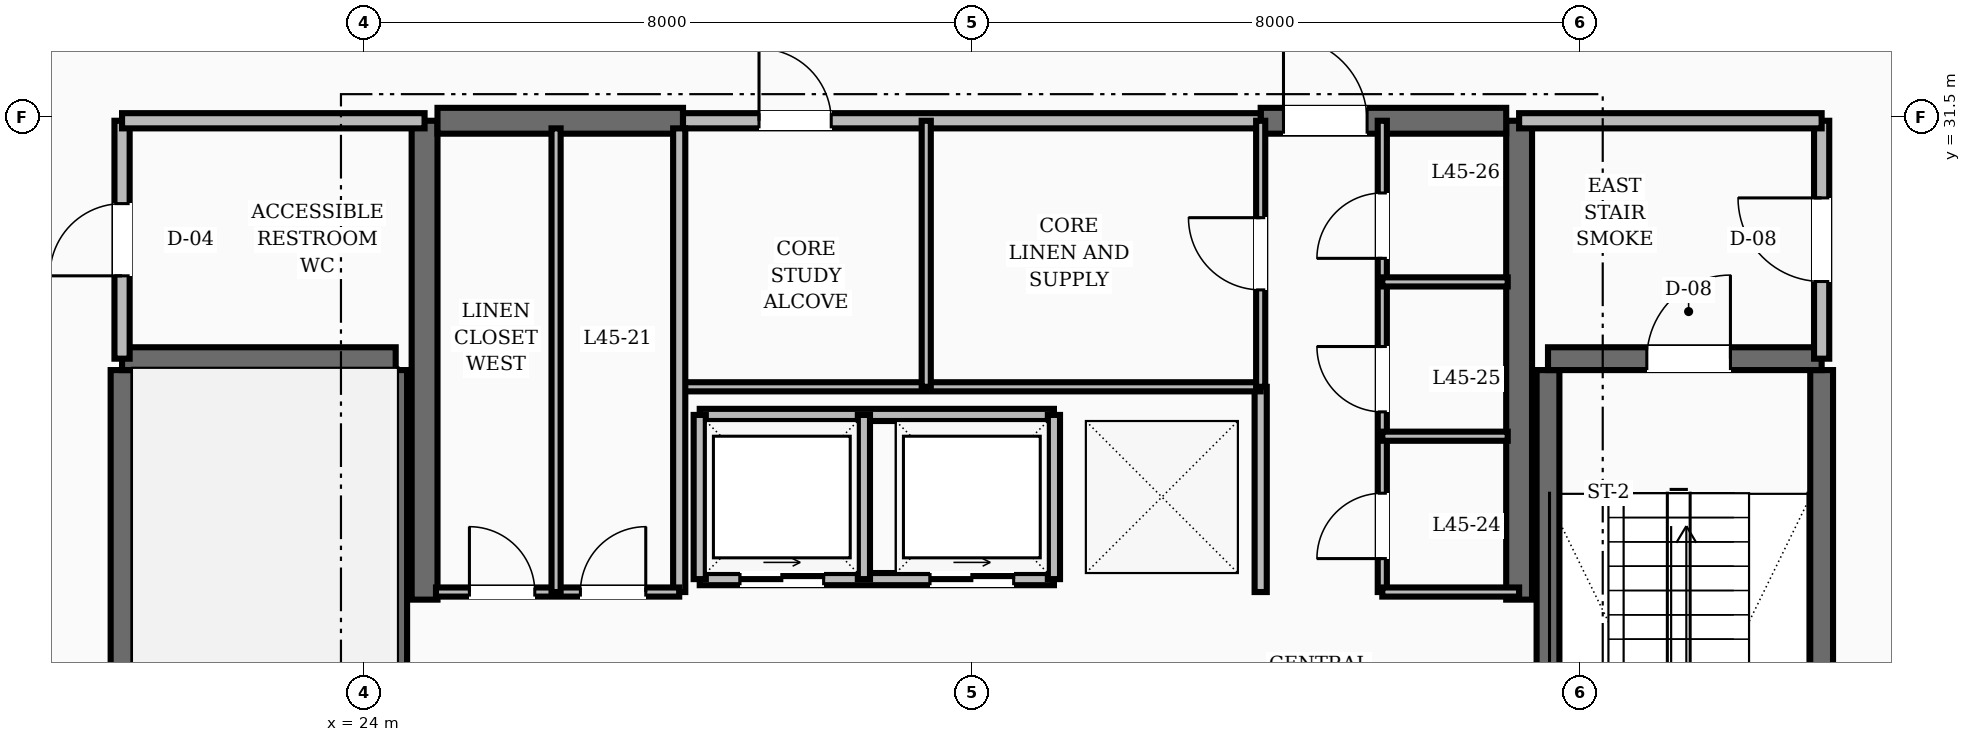
"""IFC4 building model, lengths in metres.
Left out: names, types, materials, properties, quantities, classifications, styles, units other than length and angle.
Written with IfcOpenShell. Run it as: python <this file> out.ifc"""

import sys

from ifc_helpers import new_model, si_unit, direction, frame, frame_2d, origin, place, context, subcontext, project, spatial, rectangle, extrude, element, fill, save


model = new_model("IFC4")
c1 = context("Model", 3, precision=1e-05, world=origin(), true_north=direction((0.0, 1.0)))
c2 = subcontext(c1, "Body", "Model", "MODEL_VIEW")
j1 = project(units=[si_unit("LENGTHUNIT", "METRE"), si_unit("PLANEANGLEUNIT", "RADIAN")], contexts=[c1])
p1 = place(None, origin())
s1 = spatial("IfcSite", under=j1, at=p1, CompositionType="ELEMENT")
p2 = place(p1, origin())
s2 = spatial("IfcBuilding", under=s1, at=p2, CompositionType="ELEMENT")
p3 = place(p2, frame((0.0, 0.0, 174.8)))
s3 = spatial("IfcBuildingStorey", under=s2, at=p3, CompositionType="ELEMENT", Elevation=174.8)
for number, where, z_axis, x_axis in (
    (1, (24.8, 25.15, 0.0), (0.0, 0.0, 1.0), (0.0, 1.0, 0.0)),
    (2, (39.2, 25.15, 0.0), (0.0, 0.0, 1.0), (0.0, 1.0, 0.0)),
):
    element("IfcWall", number, at=place(p3, frame(where, z_axis=z_axis, x_axis=x_axis)), inside=s3, PredefinedType="SHEAR", context=c2, shape_type="SweptSolid", body=[
        extrude(rectangle(XDim=6.3, YDim=0.34, at=frame_2d((3.15, 0.0))), origin(), (0.0, 0.0, 1.0), 3.6),
    ])
p4 = place(p3, frame((24.97, 31.45, 0.0), z_axis=(0.0, 0.0, 1.0), x_axis=(1.0, 0.0, 0.0)))
e3 = element("IfcWall", 3, at=p4, inside=s3, PredefinedType="SHEAR", context=c2, shape_type="SweptSolid", body=[
    extrude(rectangle(XDim=3.23, YDim=0.34, at=frame_2d((1.615, 0.0))), origin(), (0.0, 0.0, 1.0), 3.6),
])
p5 = place(p3, frame((35.8, 31.45, 0.0), z_axis=(0.0, 0.0, 1.0), x_axis=(1.0, 0.0, 0.0)))
e4 = element("IfcWall", 4, at=p5, inside=s3, PredefinedType="SHEAR", context=c2, shape_type="SweptSolid", body=[
    extrude(rectangle(XDim=3.23, YDim=0.34, at=frame_2d((1.615, 0.0))), origin(), (0.0, 0.0, 1.0), 3.6),
])
p6 = place(p5, frame((0.3, 0.0, 0.0)))
e5 = element("IfcOpeningElement", 5, at=p6, cuts=e4, PredefinedType="OPENING", context=c2, shape_type="SweptSolid", body=[
    extrude(rectangle(XDim=1.1, YDim=2.1, at=frame_2d((0.55, 1.05))), frame((0.0, 0.18, 0.0), z_axis=(0.0, -1.0, 0.0), x_axis=(1.0, 0.0, 0.0)), (0.0, 0.0, 1.0), 0.36),
])
for number, where, z_axis, x_axis in (
    (6, (20.82, 19.43, 0.0), (0.0, 0.0, 1.0), (0.0, 1.0, 0.0)),
    (7, (24.42, 19.43, 0.0), (0.0, 0.0, 1.0), (0.0, 1.0, 0.0)),
):
    element("IfcWall", number, at=place(p3, frame(where, z_axis=z_axis, x_axis=x_axis)), inside=s3, PredefinedType="SHEAR", context=c2, shape_type="SweptSolid", body=[
        extrude(rectangle(XDim=8.74, YDim=0.3, at=frame_2d((4.37, 0.0))), origin(), (0.0, 0.0, 1.0), 3.6),
    ])
p7 = place(p3, frame((20.82, 28.32, 0.0), z_axis=(0.0, 0.0, 1.0), x_axis=(1.0, 0.0, 0.0)))
e8 = element("IfcWall", 8, at=p7, inside=s3, PredefinedType="SHEAR", context=c2, shape_type="SweptSolid", body=[
    extrude(rectangle(XDim=3.6, YDim=0.3, at=frame_2d((1.8, 0.0))), origin(), (0.0, 0.0, 1.0), 3.6),
])
for number, where, z_axis, x_axis in (
    (9, (43.18, 19.43, 0.0), (0.0, 0.0, 1.0), (0.0, 1.0, 0.0)),
    (10, (39.58, 19.43, 0.0), (0.0, 0.0, 1.0), (0.0, 1.0, 0.0)),
):
    element("IfcWall", number, at=place(p3, frame(where, z_axis=z_axis, x_axis=x_axis)), inside=s3, PredefinedType="SHEAR", context=c2, shape_type="SweptSolid", body=[
        extrude(rectangle(XDim=8.74, YDim=0.3, at=frame_2d((4.37, 0.0))), origin(), (0.0, 0.0, 1.0), 3.6),
    ])
p8 = place(p3, frame((39.58, 28.32, 0.0), z_axis=(0.0, 0.0, 1.0), x_axis=(1.0, 0.0, 0.0)))
e11 = element("IfcWall", 11, at=p8, inside=s3, PredefinedType="SHEAR", context=c2, shape_type="SweptSolid", body=[
    extrude(rectangle(XDim=3.6, YDim=0.3, at=frame_2d((1.8, 0.0))), origin(), (0.0, 0.0, 1.0), 3.6),
])
p9 = place(p8, frame((1.3, 0.0, 0.0)))
e12 = element("IfcOpeningElement", 12, at=p9, cuts=e11, PredefinedType="OPENING", context=c2, shape_type="SweptSolid", body=[
    extrude(rectangle(XDim=1.1, YDim=2.1, at=frame_2d((0.55, 1.05))), frame((0.0, 0.16, 0.0), z_axis=(0.0, -1.0, 0.0), x_axis=(1.0, 0.0, 0.0)), (0.0, 0.0, 1.0), 0.32),
])
p10 = place(p3, frame((43.18, 28.32, 0.0), z_axis=(0.0, 0.0, 1.0), x_axis=(0.0, 1.0, 0.0)))
e13 = element("IfcWall", 13, at=p10, inside=s3, PredefinedType="SOLIDWALL", context=c2, shape_type="SweptSolid", body=[
    extrude(rectangle(XDim=3.13, YDim=0.2, at=frame_2d((1.565, 0.0))), origin(), (0.0, 0.0, 1.0), 2.8),
])
p11 = place(p10, frame((1.015, 0.0, 0.0)))
e14 = element("IfcOpeningElement", 14, at=p11, cuts=e13, PredefinedType="OPENING", context=c2, shape_type="SweptSolid", body=[
    extrude(rectangle(XDim=1.1, YDim=2.1, at=frame_2d((0.55, 1.05))), frame((0.0, 0.11, 0.0), z_axis=(0.0, -1.0, 0.0), x_axis=(1.0, 0.0, 0.0)), (0.0, 0.0, 1.0), 0.22),
])
p12 = place(p3, frame((39.2, 31.45, 0.0), z_axis=(0.0, 0.0, 1.0), x_axis=(1.0, 0.0, 0.0)))
e15 = element("IfcWall", 15, at=p12, inside=s3, PredefinedType="SOLIDWALL", context=c2, shape_type="SweptSolid", body=[
    extrude(rectangle(XDim=3.98, YDim=0.2, at=frame_2d((1.99, 0.0))), origin(), (0.0, 0.0, 1.0), 2.8),
])
p13 = place(p3, frame((20.82, 28.32, 0.0), z_axis=(0.0, 0.0, 1.0), x_axis=(0.0, 1.0, 0.0)))
e16 = element("IfcWall", 16, at=p13, inside=s3, PredefinedType="SOLIDWALL", context=c2, shape_type="SweptSolid", body=[
    extrude(rectangle(XDim=3.13, YDim=0.2, at=frame_2d((1.565, 0.0))), origin(), (0.0, 0.0, 1.0), 2.8),
])
p14 = place(p13, frame((1.09, 0.0, 0.0)))
e17 = element("IfcOpeningElement", 17, at=p14, cuts=e16, PredefinedType="OPENING", context=c2, shape_type="SweptSolid", body=[
    extrude(rectangle(XDim=0.95, YDim=2.1, at=frame_2d((0.475, 1.05))), frame((0.0, 0.11, 0.0), z_axis=(0.0, -1.0, 0.0), x_axis=(1.0, 0.0, 0.0)), (0.0, 0.0, 1.0), 0.22),
])
p15 = place(p3, frame((20.82, 31.45, 0.0), z_axis=(0.0, 0.0, 1.0), x_axis=(1.0, 0.0, 0.0)))
e18 = element("IfcWall", 18, at=p15, inside=s3, PredefinedType="SOLIDWALL", context=c2, shape_type="SweptSolid", body=[
    extrude(rectangle(XDim=3.98, YDim=0.2, at=frame_2d((1.99, 0.0))), origin(), (0.0, 0.0, 1.0), 2.8),
])
p16 = place(p3, frame((35.8, 25.25, 0.0), z_axis=(0.0, 0.0, 1.0), x_axis=(0.0, 1.0, 0.0)))
e19 = element("IfcWall", 19, at=p16, inside=s3, PredefinedType="SOLIDWALL", context=c2, shape_type="SweptSolid", body=[
    extrude(rectangle(XDim=2.7, YDim=0.16, at=frame_2d((1.35, 0.0))), origin(), (0.0, 0.0, 1.0), 2.8),
])
p17 = place(p3, frame((28.42, 25.42, 0.0), z_axis=(0.0, 0.0, 1.0), x_axis=(1.0, 0.0, 0.0)))
e20 = element("IfcWall", 20, at=p17, inside=s3, PredefinedType="SOLIDWALL", context=c2, shape_type="SweptSolid", body=[
    extrude(rectangle(XDim=4.66, YDim=0.16, at=frame_2d((2.33, 0.0))), origin(), (0.0, 0.0, 1.0), 2.8),
])
p18 = place(p17, frame((0.53, 0.0, 0.0)))
e21 = element("IfcOpeningElement", 21, at=p18, cuts=e20, PredefinedType="OPENING", context=c2, shape_type="SweptSolid", body=[
    extrude(rectangle(XDim=1.1, YDim=2.15, at=frame_2d((0.55, 1.075))), frame((0.0, 0.09, 0.0), z_axis=(0.0, -1.0, 0.0), x_axis=(1.0, 0.0, 0.0)), (0.0, 0.0, 1.0), 0.18),
])
p19 = place(p17, frame((3.03, 0.0, 0.0)))
e22 = element("IfcOpeningElement", 22, at=p19, cuts=e20, PredefinedType="OPENING", context=c2, shape_type="SweptSolid", body=[
    extrude(rectangle(XDim=1.1, YDim=2.15, at=frame_2d((0.55, 1.075))), frame((0.0, 0.09, 0.0), z_axis=(0.0, -1.0, 0.0), x_axis=(1.0, 0.0, 0.0)), (0.0, 0.0, 1.0), 0.18),
])
p20 = place(p3, frame((28.42, 27.58, 0.0), z_axis=(0.0, 0.0, 1.0), x_axis=(1.0, 0.0, 0.0)))
e23 = element("IfcWall", 23, at=p20, inside=s3, PredefinedType="SOLIDWALL", context=c2, shape_type="SweptSolid", body=[
    extrude(rectangle(XDim=4.66, YDim=0.16, at=frame_2d((2.33, 0.0))), origin(), (0.0, 0.0, 1.0), 2.8),
])
for number, where, z_axis, x_axis in (
    (24, (28.42, 25.42, 0.0), (0.0, 0.0, 1.0), (0.0, 1.0, 0.0)),
    (25, (30.58, 25.42, 0.0), (0.0, 0.0, 1.0), (0.0, 1.0, 0.0)),
    (26, (33.08, 25.42, 0.0), (0.0, 0.0, 1.0), (0.0, 1.0, 0.0)),
):
    element("IfcWall", number, at=place(p3, frame(where, z_axis=z_axis, x_axis=x_axis)), inside=s3, PredefinedType="SOLIDWALL", context=c2, shape_type="SweptSolid", body=[
        extrude(rectangle(XDim=2.16, YDim=0.16, at=frame_2d((1.08, 0.0))), origin(), (0.0, 0.0, 1.0), 2.8),
    ])
p21 = place(p3, frame((28.2, 31.45, 0.0), z_axis=(0.0, 0.0, 1.0), x_axis=(1.0, 0.0, 0.0)))
e27 = element("IfcWall", 27, at=p21, inside=s3, PredefinedType="SOLIDWALL", context=c2, shape_type="SweptSolid", body=[
    extrude(rectangle(XDim=7.6, YDim=0.2, at=frame_2d((3.8, 0.0))), origin(), (0.0, 0.0, 1.0), 2.8),
])
p22 = place(p21, frame((1.0, 0.0, 0.0)))
e28 = element("IfcOpeningElement", 28, at=p22, cuts=e27, PredefinedType="OPENING", context=c2, shape_type="SweptSolid", body=[
    extrude(rectangle(XDim=0.95, YDim=2.1, at=frame_2d((0.475, 1.05))), frame((0.0, 0.11, 0.0), z_axis=(0.0, -1.0, 0.0), x_axis=(1.0, 0.0, 0.0)), (0.0, 0.0, 1.0), 0.22),
])
p23 = place(p3, frame((28.2, 27.95, 0.0), z_axis=(0.0, 0.0, 1.0), x_axis=(1.0, 0.0, 0.0)))
e29 = element("IfcWall", 29, at=p23, inside=s3, PredefinedType="PARTITIONING", context=c2, shape_type="SweptSolid", body=[
    extrude(rectangle(XDim=7.6, YDim=0.12, at=frame_2d((3.8, 0.0))), origin(), (0.0, 0.0, 1.0), 2.8),
])
p24 = place(p3, frame((35.8, 27.95, 0.0), z_axis=(0.0, 0.0, 1.0), x_axis=(0.0, 1.0, 0.0)))
e30 = element("IfcWall", 30, at=p24, inside=s3, PredefinedType="PARTITIONING", context=c2, shape_type="SweptSolid", body=[
    extrude(rectangle(XDim=3.5, YDim=0.12, at=frame_2d((1.75, 0.0))), origin(), (0.0, 0.0, 1.0), 2.8),
])
p25 = place(p24, frame((1.275, 0.0, 0.0)))
e31 = element("IfcOpeningElement", 31, at=p25, cuts=e30, PredefinedType="OPENING", context=c2, shape_type="SweptSolid", body=[
    extrude(rectangle(XDim=0.95, YDim=2.1, at=frame_2d((0.475, 1.05))), frame((0.0, 0.07, 0.0), z_axis=(0.0, -1.0, 0.0), x_axis=(1.0, 0.0, 0.0)), (0.0, 0.0, 1.0), 0.14),
])
p26 = place(p3, frame((31.4, 27.95, 0.0), z_axis=(0.0, 0.0, 1.0), x_axis=(0.0, 1.0, 0.0)))
e32 = element("IfcWall", 32, at=p26, inside=s3, PredefinedType="PARTITIONING", context=c2, shape_type="SweptSolid", body=[
    extrude(rectangle(XDim=3.5, YDim=0.12, at=frame_2d((1.75, 0.0))), origin(), (0.0, 0.0, 1.0), 2.8),
])
p27 = place(p3, frame((28.15, 25.25, 0.0), z_axis=(0.0, 0.0, 1.0), x_axis=(0.0, 1.0, 0.0)))
e33 = element("IfcWall", 33, at=p27, inside=s3, PredefinedType="SOLIDWALL", context=c2, shape_type="SweptSolid", body=[
    extrude(rectangle(XDim=6.1, YDim=0.16, at=frame_2d((3.05, 0.0))), origin(), (0.0, 0.0, 1.0), 2.8),
])
p28 = place(p3, frame((24.95, 25.25, 0.0), z_axis=(0.0, 0.0, 1.0), x_axis=(1.0, 0.0, 0.0)))
e34 = element("IfcWall", 34, at=p28, inside=s3, PredefinedType="PARTITIONING", context=c2, shape_type="SweptSolid", body=[
    extrude(rectangle(XDim=3.2, YDim=0.12, at=frame_2d((1.6, 0.0))), origin(), (0.0, 0.0, 1.0), 2.8),
])
p29 = place(p28, frame((0.44, 0.0, 0.0)))
e35 = element("IfcOpeningElement", 35, at=p29, cuts=e34, PredefinedType="OPENING", context=c2, shape_type="SweptSolid", body=[
    extrude(rectangle(XDim=0.86, YDim=2.1, at=frame_2d((0.43, 1.05))), frame((0.0, 0.07, 0.0), z_axis=(0.0, -1.0, 0.0), x_axis=(1.0, 0.0, 0.0)), (0.0, 0.0, 1.0), 0.14),
])
p30 = place(p28, frame((1.9, 0.0, 0.0)))
e36 = element("IfcOpeningElement", 36, at=p30, cuts=e34, PredefinedType="OPENING", context=c2, shape_type="SweptSolid", body=[
    extrude(rectangle(XDim=0.86, YDim=2.1, at=frame_2d((0.43, 1.05))), frame((0.0, 0.07, 0.0), z_axis=(0.0, -1.0, 0.0), x_axis=(1.0, 0.0, 0.0)), (0.0, 0.0, 1.0), 0.14),
])
p31 = place(p3, frame((37.4, 25.25, 0.0), z_axis=(0.0, 0.0, 1.0), x_axis=(0.0, 1.0, 0.0)))
e37 = element("IfcWall", 37, at=p31, inside=s3, PredefinedType="PARTITIONING", context=c2, shape_type="SweptSolid", body=[
    extrude(rectangle(XDim=6.2, YDim=0.12, at=frame_2d((3.1, 0.0))), origin(), (0.0, 0.0, 1.0), 2.8),
])
p32 = place(p31, frame((0.44, 0.0, 0.0)))
e38 = element("IfcOpeningElement", 38, at=p32, cuts=e37, PredefinedType="OPENING", context=c2, shape_type="SweptSolid", body=[
    extrude(rectangle(XDim=0.86, YDim=2.1, at=frame_2d((0.43, 1.05))), frame((0.0, 0.07, 0.0), z_axis=(0.0, -1.0, 0.0), x_axis=(1.0, 0.0, 0.0)), (0.0, 0.0, 1.0), 0.14),
])
p33 = place(p31, frame((2.37, 0.0, 0.0)))
e39 = element("IfcOpeningElement", 39, at=p33, cuts=e37, PredefinedType="OPENING", context=c2, shape_type="SweptSolid", body=[
    extrude(rectangle(XDim=0.86, YDim=2.1, at=frame_2d((0.43, 1.05))), frame((0.0, 0.07, 0.0), z_axis=(0.0, -1.0, 0.0), x_axis=(1.0, 0.0, 0.0)), (0.0, 0.0, 1.0), 0.14),
])
p34 = place(p31, frame((4.39, 0.0, 0.0)))
e40 = element("IfcOpeningElement", 40, at=p34, cuts=e37, PredefinedType="OPENING", context=c2, shape_type="SweptSolid", body=[
    extrude(rectangle(XDim=0.86, YDim=2.1, at=frame_2d((0.43, 1.05))), frame((0.0, 0.07, 0.0), z_axis=(0.0, -1.0, 0.0), x_axis=(1.0, 0.0, 0.0)), (0.0, 0.0, 1.0), 0.14),
])
p35 = place(p3, frame((37.4, 25.25, 0.0), z_axis=(0.0, 0.0, 1.0), x_axis=(1.0, 0.0, 0.0)))
e41 = element("IfcWall", 41, at=p35, inside=s3, PredefinedType="PARTITIONING", context=c2, shape_type="SweptSolid", body=[
    extrude(rectangle(XDim=1.8, YDim=0.12, at=frame_2d((0.9, 0.0))), origin(), (0.0, 0.0, 1.0), 2.8),
])
p36 = place(p3, frame((26.53, 25.25, 0.0), z_axis=(0.0, 0.0, 1.0), x_axis=(0.0, 1.0, 0.0)))
e42 = element("IfcWall", 42, at=p36, inside=s3, PredefinedType="PARTITIONING", context=c2, shape_type="SweptSolid", body=[
    extrude(rectangle(XDim=6.1, YDim=0.12, at=frame_2d((3.05, 0.0))), origin(), (0.0, 0.0, 1.0), 2.8),
])
for number, where, z_axis, x_axis in (
    (43, (37.4, 27.3, 0.0), (0.0, 0.0, 1.0), (1.0, 0.0, 0.0)),
    (44, (37.4, 29.33, 0.0), (0.0, 0.0, 1.0), (1.0, 0.0, 0.0)),
):
    element("IfcWall", number, at=place(p3, frame(where, z_axis=z_axis, x_axis=x_axis)), inside=s3, PredefinedType="PARTITIONING", context=c2, shape_type="SweptSolid", body=[
        extrude(rectangle(XDim=1.65, YDim=0.12, at=frame_2d((0.825, 0.0))), origin(), (0.0, 0.0, 1.0), 2.8),
    ])
p37 = place(p9, origin())
e45 = element("IfcDoor", 45, at=p37, inside=s3, OperationType="SINGLE_SWING_RIGHT", PredefinedType="DOOR", context=c2, shape_type="SweptSolid", body=[
    extrude(rectangle(XDim=1.1, YDim=2.1, at=frame_2d((0.55, 1.05))), frame((0.0, 0.025, 0.0), z_axis=(0.0, -1.0, 0.0), x_axis=(1.0, 0.0, 0.0)), (0.0, 0.0, 1.0), 0.05),
])
fill(e12, e45)
p38 = place(p11, origin())
e46 = element("IfcDoor", 46, at=p38, inside=s3, OperationType="SINGLE_SWING_RIGHT", PredefinedType="DOOR", context=c2, shape_type="SweptSolid", body=[
    extrude(rectangle(XDim=1.1, YDim=2.1, at=frame_2d((0.55, 1.05))), frame((0.0, 0.025, 0.0), z_axis=(0.0, -1.0, 0.0), x_axis=(1.0, 0.0, 0.0)), (0.0, 0.0, 1.0), 0.05),
])
fill(e14, e46)
p39 = place(p14, origin())
e47 = element("IfcDoor", 47, at=p39, inside=s3, OperationType="SINGLE_SWING_LEFT", PredefinedType="DOOR", context=c2, shape_type="SweptSolid", body=[
    extrude(rectangle(XDim=0.95, YDim=2.1, at=frame_2d((0.475, 1.05))), frame((0.0, 0.025, 0.0), z_axis=(0.0, -1.0, 0.0), x_axis=(1.0, 0.0, 0.0)), (0.0, 0.0, 1.0), 0.05),
])
fill(e17, e47)
p40 = place(p6, origin())
e48 = element("IfcDoor", 48, at=p40, inside=s3, OperationType="SINGLE_SWING_LEFT", PredefinedType="DOOR", context=c2, shape_type="SweptSolid", body=[
    extrude(rectangle(XDim=1.1, YDim=2.1, at=frame_2d((0.55, 1.05))), frame((0.0, 0.025, 0.0), z_axis=(0.0, -1.0, 0.0), x_axis=(1.0, 0.0, 0.0)), (0.0, 0.0, 1.0), 0.05),
])
fill(e5, e48)
p41 = place(p18, origin())
e49 = element("IfcDoor", 49, at=p41, inside=s3, OperationType="SLIDING_TO_RIGHT", PredefinedType="DOOR", context=c2, shape_type="SweptSolid", body=[
    extrude(rectangle(XDim=1.1, YDim=2.15, at=frame_2d((0.55, 1.075))), frame((0.0, 0.025, 0.0), z_axis=(0.0, -1.0, 0.0), x_axis=(1.0, 0.0, 0.0)), (0.0, 0.0, 1.0), 0.05),
])
fill(e21, e49)
p42 = place(p19, origin())
e50 = element("IfcDoor", 50, at=p42, inside=s3, OperationType="SLIDING_TO_RIGHT", PredefinedType="DOOR", context=c2, shape_type="SweptSolid", body=[
    extrude(rectangle(XDim=1.1, YDim=2.15, at=frame_2d((0.55, 1.075))), frame((0.0, 0.025, 0.0), z_axis=(0.0, -1.0, 0.0), x_axis=(1.0, 0.0, 0.0)), (0.0, 0.0, 1.0), 0.05),
])
fill(e22, e50)
p43 = place(p22, origin())
e51 = element("IfcDoor", 51, at=p43, inside=s3, OperationType="SINGLE_SWING_LEFT", PredefinedType="DOOR", context=c2, shape_type="SweptSolid", body=[
    extrude(rectangle(XDim=0.95, YDim=2.1, at=frame_2d((0.475, 1.05))), frame((0.0, 0.025, 0.0), z_axis=(0.0, -1.0, 0.0), x_axis=(1.0, 0.0, 0.0)), (0.0, 0.0, 1.0), 0.05),
])
fill(e28, e51)
p44 = place(p25, origin())
e52 = element("IfcDoor", 52, at=p44, inside=s3, OperationType="SINGLE_SWING_RIGHT", PredefinedType="DOOR", context=c2, shape_type="SweptSolid", body=[
    extrude(rectangle(XDim=0.95, YDim=2.1, at=frame_2d((0.475, 1.05))), frame((0.0, 0.025, 0.0), z_axis=(0.0, -1.0, 0.0), x_axis=(1.0, 0.0, 0.0)), (0.0, 0.0, 1.0), 0.05),
])
fill(e31, e52)
p45 = place(p29, origin())
e53 = element("IfcDoor", 53, at=p45, inside=s3, OperationType="SINGLE_SWING_LEFT", PredefinedType="DOOR", context=c2, shape_type="SweptSolid", body=[
    extrude(rectangle(XDim=0.86, YDim=2.1, at=frame_2d((0.43, 1.05))), frame((0.0, 0.025, 0.0), z_axis=(0.0, -1.0, 0.0), x_axis=(1.0, 0.0, 0.0)), (0.0, 0.0, 1.0), 0.05),
])
fill(e35, e53)
p46 = place(p30, origin())
e54 = element("IfcDoor", 54, at=p46, inside=s3, OperationType="SINGLE_SWING_RIGHT", PredefinedType="DOOR", context=c2, shape_type="SweptSolid", body=[
    extrude(rectangle(XDim=0.86, YDim=2.1, at=frame_2d((0.43, 1.05))), frame((0.0, 0.025, 0.0), z_axis=(0.0, -1.0, 0.0), x_axis=(1.0, 0.0, 0.0)), (0.0, 0.0, 1.0), 0.05),
])
fill(e36, e54)
p47 = place(p32, origin())
e55 = element("IfcDoor", 55, at=p47, inside=s3, OperationType="SINGLE_SWING_LEFT", PredefinedType="DOOR", context=c2, shape_type="SweptSolid", body=[
    extrude(rectangle(XDim=0.86, YDim=2.1, at=frame_2d((0.43, 1.05))), frame((0.0, 0.025, 0.0), z_axis=(0.0, -1.0, 0.0), x_axis=(1.0, 0.0, 0.0)), (0.0, 0.0, 1.0), 0.05),
])
fill(e38, e55)
p48 = place(p33, origin())
e56 = element("IfcDoor", 56, at=p48, inside=s3, OperationType="SINGLE_SWING_RIGHT", PredefinedType="DOOR", context=c2, shape_type="SweptSolid", body=[
    extrude(rectangle(XDim=0.86, YDim=2.1, at=frame_2d((0.43, 1.05))), frame((0.0, 0.025, 0.0), z_axis=(0.0, -1.0, 0.0), x_axis=(1.0, 0.0, 0.0)), (0.0, 0.0, 1.0), 0.05),
])
fill(e39, e56)
p49 = place(p34, origin())
e57 = element("IfcDoor", 57, at=p49, inside=s3, OperationType="SINGLE_SWING_LEFT", PredefinedType="DOOR", context=c2, shape_type="SweptSolid", body=[
    extrude(rectangle(XDim=0.86, YDim=2.1, at=frame_2d((0.43, 1.05))), frame((0.0, 0.025, 0.0), z_axis=(0.0, -1.0, 0.0), x_axis=(1.0, 0.0, 0.0)), (0.0, 0.0, 1.0), 0.05),
])
fill(e40, e57)
save(model, sys.argv[1])
